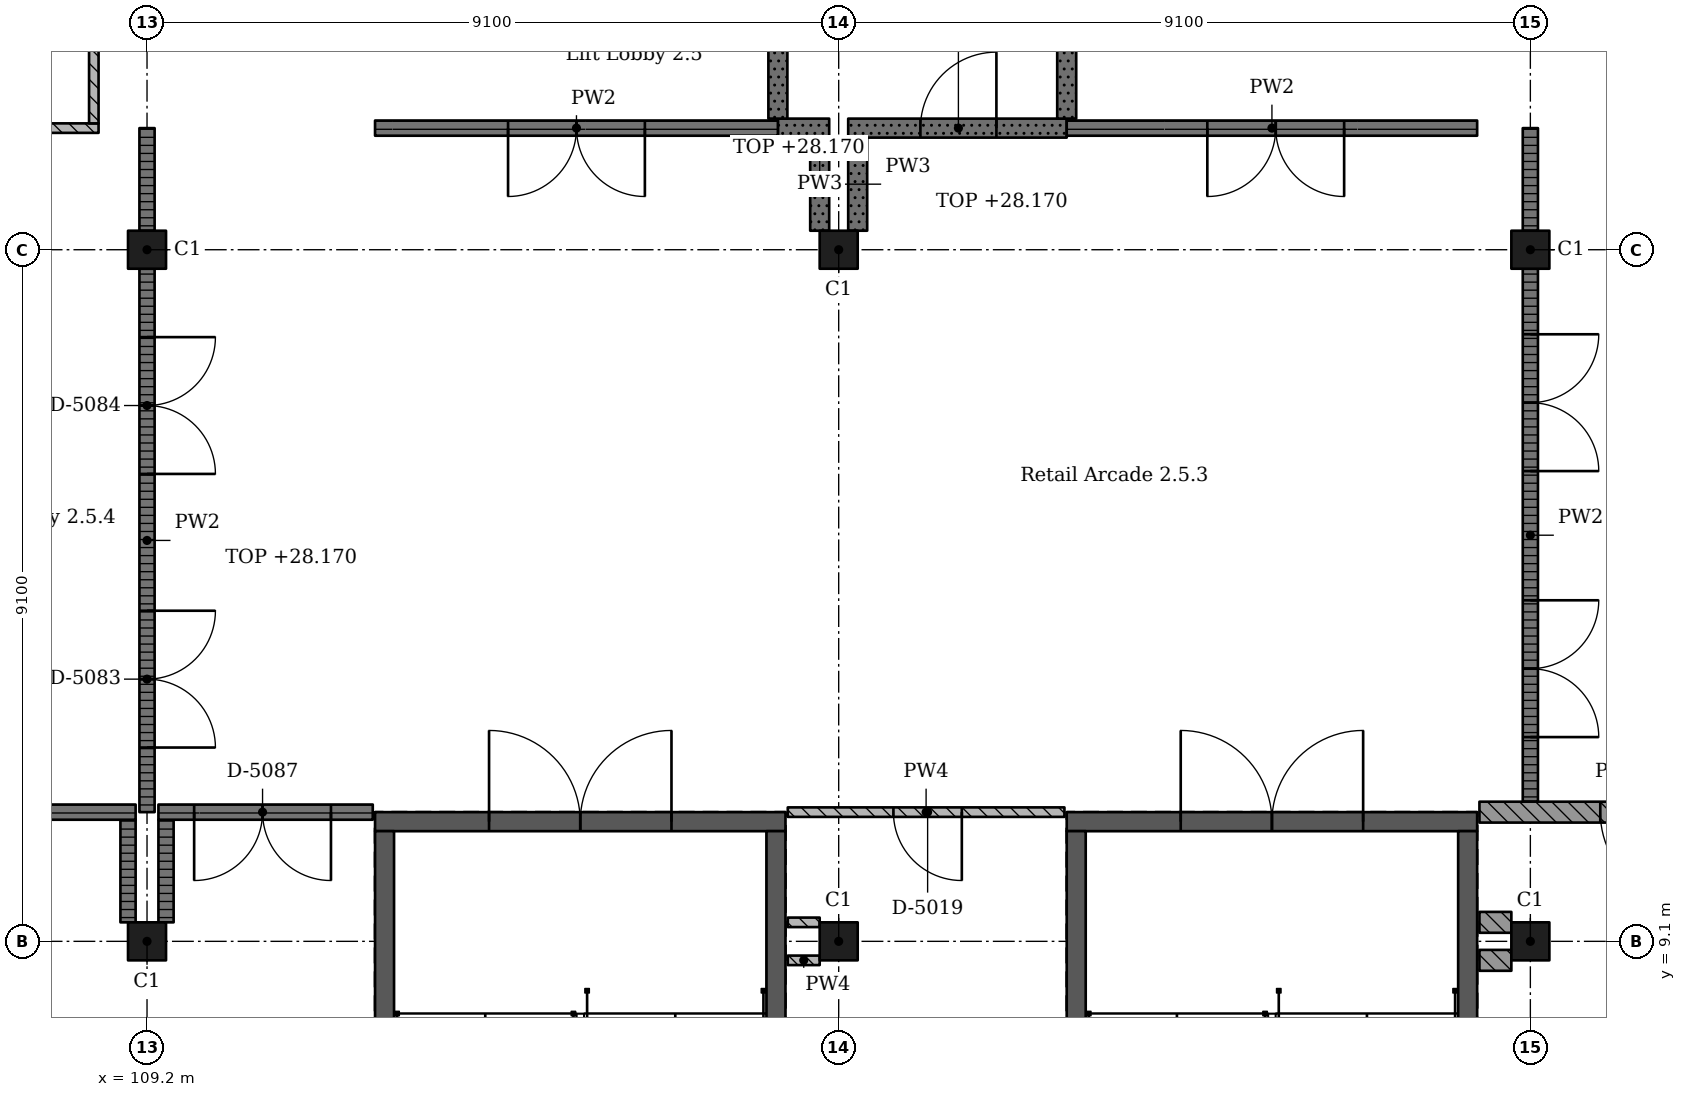
"""IFC4 building model, lengths in metres.
Left out: names, types, materials, properties, quantities, classifications, styles, units other than length and angle.
Written with IfcOpenShell. Run it as: python <this file> out.ifc"""

import sys

from ifc_helpers import new_model, si_unit, direction, frame, frame_2d, origin, origin_2d, place, context, subcontext, project, spatial, rectangle, extrude, element, fill, save


model = new_model("IFC4")
c1 = context("Model", 3, precision=1e-05, world=origin(), true_north=direction((0.0, 1.0)))
c2 = subcontext(c1, "Body", "Model", "MODEL_VIEW")
j1 = project(units=[si_unit("LENGTHUNIT", "METRE"), si_unit("PLANEANGLEUNIT", "RADIAN")], contexts=[c1])
p1 = place(None, origin())
s1 = spatial("IfcSite", under=j1, at=p1, CompositionType="ELEMENT")
p2 = place(p1, origin())
s2 = spatial("IfcBuilding", under=s1, at=p2, CompositionType="ELEMENT")
p3 = place(p2, frame((0.0, 0.0, 24.57)))
s3 = spatial("IfcBuildingStorey", under=s2, at=p3, CompositionType="ELEMENT", Elevation=24.57)
for number, where, z_axis, x_axis in (
    (1, (109.2, 9.1, 0.0), (0.0, 0.0, 1.0), (1.0, 0.0, 0.0)),
    (2, (109.2, 18.2, 0.0), (0.0, 0.0, 1.0), (1.0, 0.0, 0.0)),
    (3, (118.3, 9.1, 0.0), (0.0, 0.0, 1.0), (1.0, 0.0, 0.0)),
    (4, (118.3, 18.2, 0.0), (0.0, 0.0, 1.0), (1.0, 0.0, 0.0)),
    (5, (127.4, 9.1, 0.0), (0.0, 0.0, 1.0), (1.0, 0.0, 0.0)),
    (6, (127.4, 18.2, 0.0), (0.0, 0.0, 1.0), (1.0, 0.0, 0.0)),
):
    element("IfcColumn", number, at=place(p3, frame(where, z_axis=z_axis, x_axis=x_axis)), inside=s3, PredefinedType="COLUMN", context=c2, shape_type="SweptSolid", body=[
        extrude(rectangle(XDim=0.5, YDim=0.5, at=origin_2d()), origin(), (0.0, 0.0, 1.0), 4.55),
    ])
p4 = place(p3, frame((126.7, 10.675, 0.0), z_axis=(0.0, 0.0, 1.0), x_axis=(-1.0, 0.0, 0.0)))
e7 = element("IfcWall", 7, at=p4, inside=s3, PredefinedType="SHEAR", context=c2, shape_type="SweptSolid", body=[
    extrude(rectangle(XDim=5.4, YDim=0.25, at=frame_2d((2.7, 0.0))), origin(), (0.0, 0.0, 1.0), 4.55),
])
p5 = place(p4, frame((1.5, 0.0, 0.0)))
e8 = element("IfcOpeningElement", 8, at=p5, cuts=e7, PredefinedType="OPENING", context=c2, shape_type="SweptSolid", body=[
    extrude(rectangle(XDim=2.4, YDim=2.1, at=frame_2d((1.2, 1.05))), frame((0.0, 0.135, 0.0), z_axis=(0.0, -1.0, 0.0), x_axis=(1.0, 0.0, 0.0)), (0.0, 0.0, 1.0), 0.27),
])
for number, where, z_axis, x_axis in (
    (9, (121.425, 10.55, 0.0), (0.0, 0.0, 1.0), (0.0, -1.0, 0.0)),
    (10, (126.575, 10.55, 0.0), (0.0, 0.0, 1.0), (0.0, -1.0, 0.0)),
):
    element("IfcWall", number, at=place(p3, frame(where, z_axis=z_axis, x_axis=x_axis)), inside=s3, PredefinedType="SHEAR", context=c2, shape_type="SweptSolid", body=[
        extrude(rectangle(XDim=9.6, YDim=0.25, at=frame_2d((4.8, 0.0))), origin(), (0.0, 0.0, 1.0), 4.55),
    ])
p6 = place(p3, frame((117.6, 10.675, 0.0), z_axis=(0.0, 0.0, 1.0), x_axis=(-1.0, 0.0, 0.0)))
e11 = element("IfcWall", 11, at=p6, inside=s3, PredefinedType="SHEAR", context=c2, shape_type="SweptSolid", body=[
    extrude(rectangle(XDim=5.4, YDim=0.25, at=frame_2d((2.7, 0.0))), origin(), (0.0, 0.0, 1.0), 4.55),
])
p7 = place(p6, frame((1.5, 0.0, 0.0)))
e12 = element("IfcOpeningElement", 12, at=p7, cuts=e11, PredefinedType="OPENING", context=c2, shape_type="SweptSolid", body=[
    extrude(rectangle(XDim=2.4, YDim=2.1, at=frame_2d((1.2, 1.05))), frame((0.0, 0.135, 0.0), z_axis=(0.0, -1.0, 0.0), x_axis=(1.0, 0.0, 0.0)), (0.0, 0.0, 1.0), 0.27),
])
for number, where, z_axis, x_axis in (
    (13, (112.325, 10.55, 0.0), (0.0, 0.0, 1.0), (0.0, -1.0, 0.0)),
    (14, (117.475, 10.55, 0.0), (0.0, 0.0, 1.0), (0.0, -1.0, 0.0)),
):
    element("IfcWall", number, at=place(p3, frame(where, z_axis=z_axis, x_axis=x_axis)), inside=s3, PredefinedType="SHEAR", context=c2, shape_type="SweptSolid", body=[
        extrude(rectangle(XDim=9.6, YDim=0.25, at=frame_2d((4.8, 0.0))), origin(), (0.0, 0.0, 1.0), 4.55),
    ])
p8 = place(p3, frame((104.9, 19.8, 0.0), z_axis=(0.0, 0.0, 1.0), x_axis=(1.0, 0.0, 0.0)))
e15 = element("IfcWall", 15, at=p8, inside=s3, PredefinedType="PARTITIONING", context=c2, shape_type="SweptSolid", body=[
    extrude(rectangle(XDim=3.663, YDim=0.125, at=frame_2d((1.831, 0.0))), origin(), (0.0, 0.0, 1.0), 4.35),
])
p9 = place(p8, frame((1.35, 0.0, 0.0)))
e16 = element("IfcOpeningElement", 16, at=p9, cuts=e15, PredefinedType="OPENING", context=c2, shape_type="SweptSolid", body=[
    extrude(rectangle(XDim=0.9, YDim=2.1, at=frame_2d((0.45, 1.05))), frame((0.0, 0.073, 0.0), z_axis=(0.0, -1.0, 0.0), x_axis=(1.0, 0.0, 0.0)), (0.0, 0.0, 1.0), 0.145),
])
p10 = place(p3, frame((108.5, 19.863, 0.0), z_axis=(0.0, 0.0, 1.0), x_axis=(0.0, 1.0, 0.0)))
e17 = element("IfcWall", 17, at=p10, inside=s3, PredefinedType="PARTITIONING", context=c2, shape_type="SweptSolid", body=[
    extrude(rectangle(XDim=7.125, YDim=0.125, at=frame_2d((3.562, 0.0))), origin(), (0.0, 0.0, 1.0), 4.35),
])
p11 = place(p3, frame((108.95, 9.35, 0.0), z_axis=(0.0, 0.0, 1.0), x_axis=(0.0, 1.0, 0.0)))
e18 = element("IfcWall", 18, at=p11, inside=s3, PredefinedType="PARTITIONING", context=c2, shape_type="SweptSolid", body=[
    extrude(rectangle(XDim=1.35, YDim=0.2, at=frame_2d((0.675, 0.0))), origin(), (0.0, 0.0, 1.0), 4.35),
])
p12 = place(p3, frame((109.05, 10.8, 0.0), z_axis=(0.0, 0.0, 1.0), x_axis=(-1.0, 0.0, 0.0)))
e19 = element("IfcWall", 19, at=p12, inside=s3, PredefinedType="PARTITIONING", context=c2, shape_type="SweptSolid", body=[
    extrude(rectangle(XDim=4.15, YDim=0.2, at=frame_2d((2.075, 0.0))), origin(), (0.0, 0.0, 1.0), 4.35),
])
p13 = place(p12, frame((1.15, 0.0, 0.0)))
e20 = element("IfcOpeningElement", 20, at=p13, cuts=e19, PredefinedType="OPENING", context=c2, shape_type="SweptSolid", body=[
    extrude(rectangle(XDim=1.8, YDim=2.4, at=frame_2d((0.9, 1.2))), frame((0.0, 0.11, 0.0), z_axis=(0.0, -1.0, 0.0), x_axis=(1.0, 0.0, 0.0)), (0.0, 0.0, 1.0), 0.22),
])
p14 = place(p3, frame((109.2, 10.8, 0.0), z_axis=(0.0, 0.0, 1.0), x_axis=(0.0, 1.0, 0.0)))
e21 = element("IfcWall", 21, at=p14, inside=s3, PredefinedType="PARTITIONING", context=c2, shape_type="SweptSolid", body=[
    extrude(rectangle(XDim=7.15, YDim=0.2, at=frame_2d((3.575, 0.0))), origin(), (0.0, 0.0, 1.0), 3.6),
])
p15 = place(p14, frame((0.85, 0.0, 0.0)))
e22 = element("IfcOpeningElement", 22, at=p15, cuts=e21, PredefinedType="OPENING", context=c2, shape_type="SweptSolid", body=[
    extrude(rectangle(XDim=1.8, YDim=2.4, at=frame_2d((0.9, 1.2))), frame((0.0, 0.11, 0.0), z_axis=(0.0, -1.0, 0.0), x_axis=(1.0, 0.0, 0.0)), (0.0, 0.0, 1.0), 0.22),
])
p16 = place(p14, frame((4.45, 0.0, 0.0)))
e23 = element("IfcOpeningElement", 23, at=p16, cuts=e21, PredefinedType="OPENING", context=c2, shape_type="SweptSolid", body=[
    extrude(rectangle(XDim=1.8, YDim=2.4, at=frame_2d((0.9, 1.2))), frame((0.0, 0.11, 0.0), z_axis=(0.0, -1.0, 0.0), x_axis=(1.0, 0.0, 0.0)), (0.0, 0.0, 1.0), 0.22),
])
p17 = place(p3, frame((109.2, 18.45, 0.0), z_axis=(0.0, 0.0, 1.0), x_axis=(0.0, 1.0, 0.0)))
e24 = element("IfcWall", 24, at=p17, inside=s3, PredefinedType="PARTITIONING", context=c2, shape_type="SweptSolid", body=[
    extrude(rectangle(XDim=1.35, YDim=0.2, at=frame_2d((0.675, 0.0))), origin(), (0.0, 0.0, 1.0), 3.6),
])
p18 = place(p3, frame((109.45, 10.7, 0.0), z_axis=(0.0, 0.0, 1.0), x_axis=(0.0, -1.0, 0.0)))
e25 = element("IfcWall", 25, at=p18, inside=s3, PredefinedType="PARTITIONING", context=c2, shape_type="SweptSolid", body=[
    extrude(rectangle(XDim=1.35, YDim=0.2, at=frame_2d((0.675, 0.0))), origin(), (0.0, 0.0, 1.0), 4.35),
])
p19 = place(p3, frame((112.17, 10.8, 0.0), z_axis=(0.0, 0.0, 1.0), x_axis=(-1.0, 0.0, 0.0)))
e26 = element("IfcWall", 26, at=p19, inside=s3, PredefinedType="PARTITIONING", context=c2, shape_type="SweptSolid", body=[
    extrude(rectangle(XDim=2.82, YDim=0.2, at=frame_2d((1.41, 0.0))), origin(), (0.0, 0.0, 1.0), 4.35),
])
p20 = place(p19, frame((0.55, 0.0, 0.0)))
e27 = element("IfcOpeningElement", 27, at=p20, cuts=e26, PredefinedType="OPENING", context=c2, shape_type="SweptSolid", body=[
    extrude(rectangle(XDim=1.8, YDim=2.4, at=frame_2d((0.9, 1.2))), frame((0.0, 0.11, 0.0), z_axis=(0.0, -1.0, 0.0), x_axis=(1.0, 0.0, 0.0)), (0.0, 0.0, 1.0), 0.22),
])
p21 = place(p3, frame((112.2, 19.8, 0.0), z_axis=(0.0, 0.0, 1.0), x_axis=(1.0, 0.0, 0.0)))
e28 = element("IfcWall", 28, at=p21, inside=s3, PredefinedType="PARTITIONING", context=c2, shape_type="SweptSolid", body=[
    extrude(rectangle(XDim=5.3, YDim=0.2, at=frame_2d((2.65, 0.0))), origin(), (0.0, 0.0, 1.0), 4.35),
])
p22 = place(p21, frame((1.75, 0.0, 0.0)))
e29 = element("IfcOpeningElement", 29, at=p22, cuts=e28, PredefinedType="OPENING", context=c2, shape_type="SweptSolid", body=[
    extrude(rectangle(XDim=1.8, YDim=2.4, at=frame_2d((0.9, 1.2))), frame((0.0, 0.11, 0.0), z_axis=(0.0, -1.0, 0.0), x_axis=(1.0, 0.0, 0.0)), (0.0, 0.0, 1.0), 0.22),
])
p23 = place(p3, frame((117.5, 19.8, 0.0), z_axis=(0.0, 0.0, 1.0), x_axis=(1.0, 0.0, 0.0)))
e30 = element("IfcWall", 30, at=p23, inside=s3, PredefinedType="SOLIDWALL", context=c2, shape_type="SweptSolid", body=[
    extrude(rectangle(XDim=0.675, YDim=0.25, at=frame_2d((0.337, 0.0))), origin(), (0.0, 0.0, 1.0), 4.35),
])
p24 = place(p3, frame((117.5, 19.925, 0.0), z_axis=(0.0, 0.0, 1.0), x_axis=(0.0, 1.0, 0.0)))
e31 = element("IfcWall", 31, at=p24, inside=s3, PredefinedType="SOLIDWALL", context=c2, shape_type="SweptSolid", body=[
    extrude(rectangle(XDim=2.845, YDim=0.25, at=frame_2d((1.422, 0.0))), origin(), (0.0, 0.0, 1.0), 4.35),
])
for number, where, z_axis, x_axis in (
    (32, (117.63, 8.85, 0.0), (0.0, 0.0, 1.0), (1.0, 0.0, 0.0)),
    (33, (118.05, 9.35, 0.0), (0.0, 0.0, 1.0), (-1.0, 0.0, 0.0)),
):
    element("IfcWall", number, at=place(p3, frame(where, z_axis=z_axis, x_axis=x_axis)), inside=s3, PredefinedType="PARTITIONING", context=c2, shape_type="SweptSolid", body=[
        extrude(rectangle(XDim=0.42, YDim=0.125, at=frame_2d((0.21, 0.0))), origin(), (0.0, 0.0, 1.0), 4.35),
    ])
p25 = place(p3, frame((118.05, 19.675, 0.0), z_axis=(0.0, 0.0, 1.0), x_axis=(0.0, -1.0, 0.0)))
e34 = element("IfcWall", 34, at=p25, inside=s3, PredefinedType="SOLIDWALL", context=c2, shape_type="SweptSolid", body=[
    extrude(rectangle(XDim=1.225, YDim=0.25, at=frame_2d((0.613, 0.0))), origin(), (0.0, 0.0, 1.0), 3.6),
])
p26 = place(p3, frame((118.425, 19.8, 0.0), z_axis=(0.0, 0.0, 1.0), x_axis=(1.0, 0.0, 0.0)))
e35 = element("IfcWall", 35, at=p26, inside=s3, PredefinedType="SOLIDWALL", context=c2, shape_type="SweptSolid", body=[
    extrude(rectangle(XDim=2.875, YDim=0.25, at=frame_2d((1.438, 0.0))), origin(), (0.0, 0.0, 1.0), 4.35),
])
p27 = place(p26, frame((0.95, 0.0, 0.0)))
e36 = element("IfcOpeningElement", 36, at=p27, cuts=e35, PredefinedType="OPENING", context=c2, shape_type="SweptSolid", body=[
    extrude(rectangle(XDim=1.0, YDim=2.1, at=frame_2d((0.5, 1.05))), frame((0.0, 0.135, 0.0), z_axis=(0.0, -1.0, 0.0), x_axis=(1.0, 0.0, 0.0)), (0.0, 0.0, 1.0), 0.27),
])
p28 = place(p3, frame((118.55, 18.45, 0.0), z_axis=(0.0, 0.0, 1.0), x_axis=(0.0, 1.0, 0.0)))
e37 = element("IfcWall", 37, at=p28, inside=s3, PredefinedType="SOLIDWALL", context=c2, shape_type="SweptSolid", body=[
    extrude(rectangle(XDim=1.225, YDim=0.25, at=frame_2d((0.613, 0.0))), origin(), (0.0, 0.0, 1.0), 3.6),
])
p29 = place(p3, frame((121.27, 10.8, 0.0), z_axis=(0.0, 0.0, 1.0), x_axis=(-1.0, 0.0, 0.0)))
e38 = element("IfcWall", 38, at=p29, inside=s3, PredefinedType="PARTITIONING", context=c2, shape_type="SweptSolid", body=[
    extrude(rectangle(XDim=3.64, YDim=0.125, at=frame_2d((1.82, 0.0))), origin(), (0.0, 0.0, 1.0), 4.35),
])
p30 = place(p29, frame((1.35, 0.0, 0.0)))
e39 = element("IfcOpeningElement", 39, at=p30, cuts=e38, PredefinedType="OPENING", context=c2, shape_type="SweptSolid", body=[
    extrude(rectangle(XDim=0.9, YDim=2.1, at=frame_2d((0.45, 1.05))), frame((0.0, 0.073, 0.0), z_axis=(0.0, -1.0, 0.0), x_axis=(1.0, 0.0, 0.0)), (0.0, 0.0, 1.0), 0.145),
])
p31 = place(p3, frame((121.3, 19.8, 0.0), z_axis=(0.0, 0.0, 1.0), x_axis=(1.0, 0.0, 0.0)))
e40 = element("IfcWall", 40, at=p31, inside=s3, PredefinedType="PARTITIONING", context=c2, shape_type="SweptSolid", body=[
    extrude(rectangle(XDim=5.4, YDim=0.2, at=frame_2d((2.7, 0.0))), origin(), (0.0, 0.0, 1.0), 4.35),
])
p32 = place(p31, frame((1.85, 0.0, 0.0)))
e41 = element("IfcOpeningElement", 41, at=p32, cuts=e40, PredefinedType="OPENING", context=c2, shape_type="SweptSolid", body=[
    extrude(rectangle(XDim=1.8, YDim=2.4, at=frame_2d((0.9, 1.2))), frame((0.0, 0.11, 0.0), z_axis=(0.0, -1.0, 0.0), x_axis=(1.0, 0.0, 0.0)), (0.0, 0.0, 1.0), 0.22),
])
p33 = place(p3, frame((121.3, 19.925, 0.0), z_axis=(0.0, 0.0, 1.0), x_axis=(0.0, 1.0, 0.0)))
e42 = element("IfcWall", 42, at=p33, inside=s3, PredefinedType="SOLIDWALL", context=c2, shape_type="SweptSolid", body=[
    extrude(rectangle(XDim=6.945, YDim=0.25, at=frame_2d((3.473, 0.0))), origin(), (0.0, 0.0, 1.0), 4.35),
])
for number, where, z_axis, x_axis in (
    (43, (126.73, 8.85, 0.0), (0.0, 0.0, 1.0), (1.0, 0.0, 0.0)),
    (44, (127.15, 9.35, 0.0), (0.0, 0.0, 1.0), (-1.0, 0.0, 0.0)),
):
    element("IfcWall", number, at=place(p3, frame(where, z_axis=z_axis, x_axis=x_axis)), inside=s3, PredefinedType="SOLIDWALL", context=c2, shape_type="SweptSolid", body=[
        extrude(rectangle(XDim=0.42, YDim=0.275, at=frame_2d((0.21, 0.0))), origin(), (0.0, 0.0, 1.0), 4.35),
    ])
p34 = place(p3, frame((126.73, 10.8, 0.0), z_axis=(0.0, 0.0, 1.0), x_axis=(1.0, 0.0, 0.0)))
e45 = element("IfcWall", 45, at=p34, inside=s3, PredefinedType="SOLIDWALL", context=c2, shape_type="SweptSolid", body=[
    extrude(rectangle(XDim=3.64, YDim=0.275, at=frame_2d((1.82, 0.0))), origin(), (0.0, 0.0, 1.0), 4.35),
])
p35 = place(p34, frame((1.59, 0.0, 0.0)))
e46 = element("IfcOpeningElement", 46, at=p35, cuts=e45, PredefinedType="OPENING", context=c2, shape_type="SweptSolid", body=[
    extrude(rectangle(XDim=1.2, YDim=2.4, at=frame_2d((0.6, 1.2))), frame((0.0, 0.147, 0.0), z_axis=(0.0, -1.0, 0.0), x_axis=(1.0, 0.0, 0.0)), (0.0, 0.0, 1.0), 0.295),
])
p36 = place(p3, frame((127.4, 10.938, 0.0), z_axis=(0.0, 0.0, 1.0), x_axis=(0.0, 1.0, 0.0)))
e47 = element("IfcWall", 47, at=p36, inside=s3, PredefinedType="PARTITIONING", context=c2, shape_type="SweptSolid", body=[
    extrude(rectangle(XDim=7.012, YDim=0.2, at=frame_2d((3.506, 0.0))), origin(), (0.0, 0.0, 1.0), 3.6),
])
p37 = place(p36, frame((0.85, 0.0, 0.0)))
e48 = element("IfcOpeningElement", 48, at=p37, cuts=e47, PredefinedType="OPENING", context=c2, shape_type="SweptSolid", body=[
    extrude(rectangle(XDim=1.8, YDim=2.4, at=frame_2d((0.9, 1.2))), frame((0.0, 0.11, 0.0), z_axis=(0.0, -1.0, 0.0), x_axis=(1.0, 0.0, 0.0)), (0.0, 0.0, 1.0), 0.22),
])
p38 = place(p36, frame((4.35, 0.0, 0.0)))
e49 = element("IfcOpeningElement", 49, at=p38, cuts=e47, PredefinedType="OPENING", context=c2, shape_type="SweptSolid", body=[
    extrude(rectangle(XDim=1.8, YDim=2.4, at=frame_2d((0.9, 1.2))), frame((0.0, 0.11, 0.0), z_axis=(0.0, -1.0, 0.0), x_axis=(1.0, 0.0, 0.0)), (0.0, 0.0, 1.0), 0.22),
])
p39 = place(p3, frame((127.4, 18.45, 0.0), z_axis=(0.0, 0.0, 1.0), x_axis=(0.0, 1.0, 0.0)))
e50 = element("IfcWall", 50, at=p39, inside=s3, PredefinedType="PARTITIONING", context=c2, shape_type="SweptSolid", body=[
    extrude(rectangle(XDim=1.35, YDim=0.2, at=frame_2d((0.675, 0.0))), origin(), (0.0, 0.0, 1.0), 3.6),
])
p40 = place(p27, origin())
e51 = element("IfcDoor", 51, at=p40, inside=s3, OperationType="SINGLE_SWING_LEFT", PredefinedType="DOOR", context=c2, shape_type="SweptSolid", body=[
    extrude(rectangle(XDim=1.0, YDim=2.1, at=frame_2d((0.5, 1.05))), frame((0.0, 0.025, 0.0), z_axis=(0.0, -1.0, 0.0), x_axis=(1.0, 0.0, 0.0)), (0.0, 0.0, 1.0), 0.05),
])
fill(e36, e51)
p41 = place(p35, origin())
e52 = element("IfcDoor", 52, at=p41, inside=s3, OperationType="SINGLE_SWING_RIGHT", PredefinedType="DOOR", context=c2, shape_type="SweptSolid", body=[
    extrude(rectangle(XDim=1.2, YDim=2.4, at=frame_2d((0.6, 1.2))), frame((0.0, 0.025, 0.0), z_axis=(0.0, -1.0, 0.0), x_axis=(1.0, 0.0, 0.0)), (0.0, 0.0, 1.0), 0.05),
])
fill(e46, e52)
p42 = place(p30, origin())
e53 = element("IfcDoor", 53, at=p42, inside=s3, OperationType="SINGLE_SWING_RIGHT", PredefinedType="DOOR", context=c2, shape_type="SweptSolid", body=[
    extrude(rectangle(XDim=0.9, YDim=2.1, at=frame_2d((0.45, 1.05))), frame((0.0, 0.025, 0.0), z_axis=(0.0, -1.0, 0.0), x_axis=(1.0, 0.0, 0.0)), (0.0, 0.0, 1.0), 0.05),
])
fill(e39, e53)
p43 = place(p37, origin())
e54 = element("IfcDoor", 54, at=p43, inside=s3, OperationType="DOUBLE_DOOR_SINGLE_SWING", PredefinedType="DOOR", context=c2, shape_type="SweptSolid", body=[
    extrude(rectangle(XDim=1.8, YDim=2.4, at=frame_2d((0.9, 1.2))), frame((0.0, 0.025, 0.0), z_axis=(0.0, -1.0, 0.0), x_axis=(1.0, 0.0, 0.0)), (0.0, 0.0, 1.0), 0.05),
])
fill(e48, e54)
p44 = place(p38, origin())
e55 = element("IfcDoor", 55, at=p44, inside=s3, OperationType="DOUBLE_DOOR_SINGLE_SWING", PredefinedType="DOOR", context=c2, shape_type="SweptSolid", body=[
    extrude(rectangle(XDim=1.8, YDim=2.4, at=frame_2d((0.9, 1.2))), frame((0.0, 0.025, 0.0), z_axis=(0.0, -1.0, 0.0), x_axis=(1.0, 0.0, 0.0)), (0.0, 0.0, 1.0), 0.05),
])
fill(e49, e55)
p45 = place(p15, origin())
e56 = element("IfcDoor", 56, at=p45, inside=s3, OperationType="DOUBLE_DOOR_SINGLE_SWING", PredefinedType="DOOR", context=c2, shape_type="SweptSolid", body=[
    extrude(rectangle(XDim=1.8, YDim=2.4, at=frame_2d((0.9, 1.2))), frame((0.0, 0.025, 0.0), z_axis=(0.0, -1.0, 0.0), x_axis=(1.0, 0.0, 0.0)), (0.0, 0.0, 1.0), 0.05),
])
fill(e22, e56)
p46 = place(p16, origin())
e57 = element("IfcDoor", 57, at=p46, inside=s3, OperationType="DOUBLE_DOOR_SINGLE_SWING", PredefinedType="DOOR", context=c2, shape_type="SweptSolid", body=[
    extrude(rectangle(XDim=1.8, YDim=2.4, at=frame_2d((0.9, 1.2))), frame((0.0, 0.025, 0.0), z_axis=(0.0, -1.0, 0.0), x_axis=(1.0, 0.0, 0.0)), (0.0, 0.0, 1.0), 0.05),
])
fill(e23, e57)
p47 = place(p22, origin())
e58 = element("IfcDoor", 58, at=p47, inside=s3, OperationType="DOUBLE_DOOR_SINGLE_SWING", PredefinedType="DOOR", context=c2, shape_type="SweptSolid", body=[
    extrude(rectangle(XDim=1.8, YDim=2.4, at=frame_2d((0.9, 1.2))), frame((0.0, 0.025, 0.0), z_axis=(0.0, -1.0, 0.0), x_axis=(1.0, 0.0, 0.0)), (0.0, 0.0, 1.0), 0.05),
])
fill(e29, e58)
p48 = place(p32, origin())
e59 = element("IfcDoor", 59, at=p48, inside=s3, OperationType="DOUBLE_DOOR_SINGLE_SWING", PredefinedType="DOOR", context=c2, shape_type="SweptSolid", body=[
    extrude(rectangle(XDim=1.8, YDim=2.4, at=frame_2d((0.9, 1.2))), frame((0.0, 0.025, 0.0), z_axis=(0.0, -1.0, 0.0), x_axis=(1.0, 0.0, 0.0)), (0.0, 0.0, 1.0), 0.05),
])
fill(e41, e59)
p49 = place(p20, origin())
e60 = element("IfcDoor", 60, at=p49, inside=s3, OperationType="DOUBLE_DOOR_SINGLE_SWING", PredefinedType="DOOR", context=c2, shape_type="SweptSolid", body=[
    extrude(rectangle(XDim=1.8, YDim=2.4, at=frame_2d((0.9, 1.2))), frame((0.0, 0.025, 0.0), z_axis=(0.0, -1.0, 0.0), x_axis=(1.0, 0.0, 0.0)), (0.0, 0.0, 1.0), 0.05),
])
fill(e27, e60)
p50 = place(p5, origin())
e61 = element("IfcDoor", 61, at=p50, inside=s3, OperationType="DOUBLE_DOOR_SINGLE_SWING", PredefinedType="DOOR", context=c2, shape_type="SweptSolid", body=[
    extrude(rectangle(XDim=2.4, YDim=2.1, at=frame_2d((1.2, 1.05))), frame((0.0, 0.025, 0.0), z_axis=(0.0, -1.0, 0.0), x_axis=(1.0, 0.0, 0.0)), (0.0, 0.0, 1.0), 0.05),
])
fill(e8, e61)
p51 = place(p7, origin())
e62 = element("IfcDoor", 62, at=p51, inside=s3, OperationType="DOUBLE_DOOR_SINGLE_SWING", PredefinedType="DOOR", context=c2, shape_type="SweptSolid", body=[
    extrude(rectangle(XDim=2.4, YDim=2.1, at=frame_2d((1.2, 1.05))), frame((0.0, 0.025, 0.0), z_axis=(0.0, -1.0, 0.0), x_axis=(1.0, 0.0, 0.0)), (0.0, 0.0, 1.0), 0.05),
])
fill(e12, e62)
save(model, sys.argv[1])
